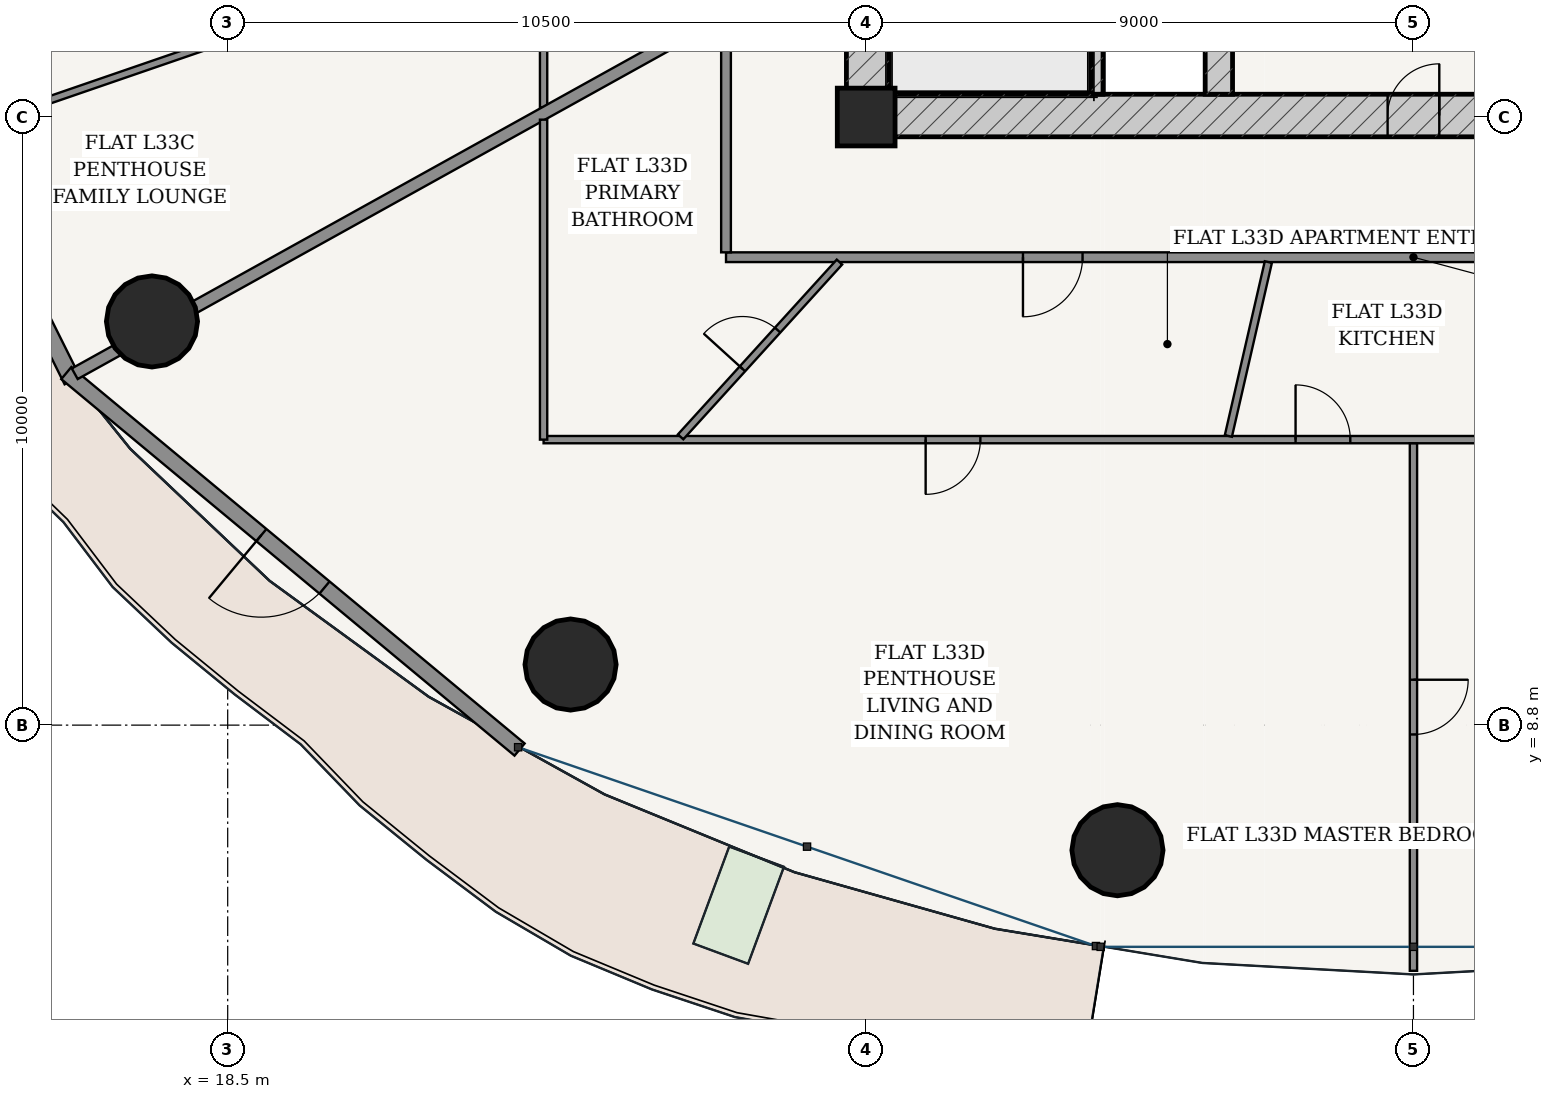
"""IFC4 building model, lengths in metres.
Left out: names, types, materials, properties, quantities, classifications, styles, units other than length and angle.
Written with IfcOpenShell. Run it as: python <this file> out.ifc"""

import sys

from ifc_helpers import new_model, si_unit, direction, frame, frame_2d, origin, origin_2d, place, context, subcontext, project, spatial, rectangle, hollow_circle, extrude, source, transform, mapped, element, fill, save


model = new_model("IFC4")
c1 = context("Model", 3, precision=1e-05, world=origin(), true_north=direction((-0.2419218956, 0.970295726276)))
c2 = subcontext(c1, "Body", "Model", "MODEL_VIEW")
j1 = project(units=[si_unit("LENGTHUNIT", "METRE"), si_unit("PLANEANGLEUNIT", "RADIAN")], contexts=[c1])
p1 = place(None, origin())
s1 = spatial("IfcSite", under=j1, at=p1, CompositionType="ELEMENT")
p2 = place(p1, origin())
s2 = spatial("IfcBuilding", under=s1, at=p2, CompositionType="ELEMENT")
p3 = place(p2, frame((0.0, 0.0, 126.6)))
s3 = spatial("IfcBuildingStorey", under=s2, at=p3, CompositionType="ELEMENT", Elevation=126.6)
p4 = place(p3, frame((29.0, 18.8, 0.0), z_axis=(0.0, 0.0, 1.0), x_axis=(1.0, 0.0, 0.0)))
e1 = element("IfcColumn", 1, at=p4, inside=s3, PredefinedType="COLUMN", context=c2, shape_type="SweptSolid", body=[
    extrude(rectangle(XDim=0.95, YDim=0.95, at=origin_2d()), origin(), (0.0, 0.0, 1.0), 3.6),
])
p5 = place(p3, frame((28.675, 18.825, 0.0), z_axis=(0.0, 0.0, 1.0), x_axis=(1.0, 0.0, 0.0)))
e2 = element("IfcWall", 2, at=p5, inside=s3, PredefinedType="SHEAR", context=c2, shape_type="SweptSolid", body=[
    extrude(rectangle(XDim=18.65, YDim=0.7, at=frame_2d((9.325, 0.0))), origin(), (0.0, 0.0, 1.0), 3.15),
])
p6 = place(p5, frame((8.9, 0.0, 0.0)))
e3 = element("IfcOpeningElement", 3, at=p6, cuts=e2, PredefinedType="OPENING", context=c2, shape_type="SweptSolid", body=[
    extrude(rectangle(XDim=0.85, YDim=2.1, at=frame_2d((0.425, 1.05))), frame((0.0, 0.36, 0.0), z_axis=(0.0, -1.0, 0.0), x_axis=(1.0, 0.0, 0.0)), (0.0, 0.0, 1.0), 0.72),
])
p7 = place(p3, frame((29.025, 19.175, 0.0), z_axis=(0.0, 0.0, 1.0), x_axis=(0.0, 1.0, 0.0)))
e4 = element("IfcWall", 4, at=p7, inside=s3, PredefinedType="SHEAR", context=c2, shape_type="SweptSolid", body=[
    extrude(rectangle(XDim=15.25, YDim=0.7, at=frame_2d((7.625, 0.0))), origin(), (0.0, 0.0, 1.0), 3.15),
])
p8 = place(p7, frame((9.875, 0.0, 0.0)))
e5 = element("IfcOpeningElement", 5, at=p8, cuts=e4, PredefinedType="OPENING", context=c2, shape_type="SweptSolid", body=[
    extrude(rectangle(XDim=1.5, YDim=2.2, at=frame_2d((0.75, 1.1))), frame((0.0, 0.36, 0.0), z_axis=(0.0, -1.0, 0.0), x_axis=(1.0, 0.0, 0.0)), (0.0, 0.0, 1.0), 0.72),
])
p9 = place(p3, frame((32.795, 19.175, 0.0), z_axis=(0.0, 0.0, 1.0), x_axis=(0.0, 1.0, 0.0)))
e6 = element("IfcWall", 6, at=p9, inside=s3, PredefinedType="SOLIDWALL", context=c2, shape_type="SweptSolid", body=[
    extrude(rectangle(XDim=7.375, YDim=0.2, at=frame_2d((3.688, 0.0))), origin(), (0.0, 0.0, 1.0), 3.15),
])
p10 = place(p3, frame((34.8, 19.175, 0.0), z_axis=(0.0, 0.0, 1.0), x_axis=(0.0, 1.0, 0.0)))
e7 = element("IfcWall", 7, at=p10, inside=s3, PredefinedType="SHEAR", context=c2, shape_type="SweptSolid", body=[
    extrude(rectangle(XDim=15.25, YDim=0.45, at=frame_2d((7.625, 0.0))), origin(), (0.0, 0.0, 1.0), 3.15),
])
p11 = place(p10, frame((7.8, 0.0, 0.0)))
e8 = element("IfcOpeningElement", 8, at=p11, cuts=e7, PredefinedType="OPENING", context=c2, shape_type="SweptSolid", body=[
    extrude(rectangle(XDim=1.05, YDim=2.15, at=frame_2d((0.525, 1.075))), frame((0.0, 0.235, 0.0), z_axis=(0.0, -1.0, 0.0), x_axis=(1.0, 0.0, 0.0)), (0.0, 0.0, 1.0), 0.47),
])
for number, where, z_axis, x_axis in (
    (9, (17.255, 15.438, 0.0), (0.0, 0.0, 1.0), (1.0, 0.0, 0.0)),
    (10, (24.138, 9.796, 0.0), (0.0, 0.0, 1.0), (1.0, 0.0, 0.0)),
    (11, (33.133, 6.743, 0.0), (0.0, 0.0, 1.0), (1.0, 0.0, 0.0)),
):
    element("IfcColumn", number, at=place(p3, frame(where, z_axis=z_axis, x_axis=x_axis)), inside=s3, PredefinedType="COLUMN", context=c2, shape_type="SweptSolid", body=[
        extrude(hollow_circle(Radius=0.75, WallThickness=0.045, at=origin_2d()), origin(), (0.0, 0.0, 1.0), 3.6),
    ])
p12 = place(p3, frame((11.905, 22.566, 0.0), z_axis=(0.0, 0.0, 1.0), x_axis=(0.446274562077, -0.894896091869, 0.0)))
e12 = element("IfcWall", 12, at=p12, inside=s3, PredefinedType="SOLIDWALL", context=c2, shape_type="SweptSolid", body=[
    extrude(rectangle(XDim=9.05, YDim=0.28, at=frame_2d((4.525, 0.0))), origin(), (0.0, 0.0, 1.0), 3.15),
])
p13 = place(p12, frame((1.394, 0.0, 0.85)))
e13 = element("IfcOpeningElement", 13, at=p13, cuts=e12, PredefinedType="OPENING", context=c2, shape_type="SweptSolid", body=[
    extrude(rectangle(XDim=2.1, YDim=1.95, at=frame_2d((1.05, 0.975))), frame((0.0, 0.15, 0.0), z_axis=(0.0, -1.0, 0.0), x_axis=(1.0, 0.0, 0.0)), (0.0, 0.0, 1.0), 0.3),
])
p14 = place(p12, frame((5.557, 0.0, 0.85)))
e14 = element("IfcOpeningElement", 14, at=p14, cuts=e12, PredefinedType="OPENING", context=c2, shape_type="SweptSolid", body=[
    extrude(rectangle(XDim=2.1, YDim=1.95, at=frame_2d((1.05, 0.975))), frame((0.0, 0.15, 0.0), z_axis=(0.0, -1.0, 0.0), x_axis=(1.0, 0.0, 0.0)), (0.0, 0.0, 1.0), 0.3),
])
p15 = place(p3, frame((15.846, 14.59, 0.0), z_axis=(0.0, 0.0, 1.0), x_axis=(0.769254958887, -0.638941944333, 0.0)))
e15 = element("IfcWall", 15, at=p15, inside=s3, PredefinedType="SOLIDWALL", context=c2, shape_type="SweptSolid", body=[
    extrude(rectangle(XDim=9.69, YDim=0.26, at=frame_2d((4.845, 0.0))), origin(), (0.0, 0.0, 1.0), 3.15),
])
p16 = place(p15, frame((4.17, 0.0, 0.0)))
e16 = element("IfcOpeningElement", 16, at=p16, cuts=e15, PredefinedType="OPENING", context=c2, shape_type="SweptSolid", body=[
    extrude(rectangle(XDim=1.35, YDim=2.2, at=frame_2d((0.675, 1.1))), frame((0.0, 0.14, 0.0), z_axis=(0.0, -1.0, 0.0), x_axis=(1.0, 0.0, 0.0)), (0.0, 0.0, 1.0), 0.28),
])
p17 = place(p3, frame((26.695, 16.495, 0.0), z_axis=(0.0, 0.0, 1.0), x_axis=(1.0, 0.0, 0.0)))
e17 = element("IfcWall", 17, at=p17, inside=s3, PredefinedType="PARTITIONING", context=c2, shape_type="SweptSolid", body=[
    extrude(rectangle(XDim=22.61, YDim=0.16, at=frame_2d((11.305, 0.0))), origin(), (0.0, 0.0, 1.0), 2.596),
])
p18 = place(p17, frame((4.883, 0.0, 0.0)))
e18 = element("IfcOpeningElement", 18, at=p18, cuts=e17, PredefinedType="OPENING", context=c2, shape_type="SweptSolid", body=[
    extrude(rectangle(XDim=0.98, YDim=2.2, at=frame_2d((0.49, 1.1))), frame((0.0, 0.09, 0.0), z_axis=(0.0, -1.0, 0.0), x_axis=(1.0, 0.0, 0.0)), (0.0, 0.0, 1.0), 0.18),
])
p19 = place(p3, frame((26.695, 16.575, 0.0), z_axis=(0.0, 0.0, 1.0), x_axis=(0.0, 1.0, 0.0)))
e19 = element("IfcWall", 19, at=p19, inside=s3, PredefinedType="PARTITIONING", context=c2, shape_type="SweptSolid", body=[
    extrude(rectangle(XDim=20.45, YDim=0.16, at=frame_2d((10.225, 0.0))), origin(), (0.0, 0.0, 1.0), 2.596),
])
p20 = place(p19, frame((9.547, 0.0, 0.0)))
e20 = element("IfcOpeningElement", 20, at=p20, cuts=e19, PredefinedType="OPENING", context=c2, shape_type="SweptSolid", body=[
    extrude(rectangle(XDim=0.98, YDim=2.2, at=frame_2d((0.49, 1.1))), frame((0.0, 0.09, 0.0), z_axis=(0.0, -1.0, 0.0), x_axis=(1.0, 0.0, 0.0)), (0.0, 0.0, 1.0), 0.18),
])
p21 = place(p3, frame((23.695, 18.961, 0.0), z_axis=(0.0, 0.0, 1.0), x_axis=(0.0, 1.0, 0.0)))
e21 = element("IfcWall", 21, at=p21, inside=s3, PredefinedType="PARTITIONING", context=c2, shape_type="SweptSolid", body=[
    extrude(rectangle(XDim=15.679, YDim=0.12, at=frame_2d((7.839, 0.0))), origin(), (0.0, 0.0, 1.0), 2.596),
])
p22 = place(p21, frame((7.625, 0.0, 0.0)))
e22 = element("IfcOpeningElement", 22, at=p22, cuts=e21, PredefinedType="OPENING", context=c2, shape_type="SweptSolid", body=[
    extrude(rectangle(XDim=0.9, YDim=2.15, at=frame_2d((0.45, 1.075))), frame((0.0, 0.07, 0.0), z_axis=(0.0, -1.0, 0.0), x_axis=(1.0, 0.0, 0.0)), (0.0, 0.0, 1.0), 0.14),
])
p23 = place(p21, frame((1.128, 0.0, 0.0)))
e23 = element("IfcOpeningElement", 23, at=p23, cuts=e21, PredefinedType="OPENING", context=c2, shape_type="SweptSolid", body=[
    extrude(rectangle(XDim=0.9, YDim=2.15, at=frame_2d((0.45, 1.075))), frame((0.0, 0.07, 0.0), z_axis=(0.0, -1.0, 0.0), x_axis=(1.0, 0.0, 0.0)), (0.0, 0.0, 1.0), 0.14),
])
p24 = place(p3, frame((23.636, 21.857, 0.0), z_axis=(0.0, 0.0, 1.0), x_axis=(-0.945571197348, -0.325415289661, 0.0)))
e24 = element("IfcWall", 24, at=p24, inside=s3, PredefinedType="PARTITIONING", context=c2, shape_type="SweptSolid", body=[
    extrude(rectangle(XDim=10.737, YDim=0.12, at=frame_2d((5.368, 0.0))), origin(), (0.0, 0.0, 1.0), 2.666),
])
p25 = place(p24, frame((4.918, 0.0, 0.0)))
e25 = element("IfcOpeningElement", 25, at=p25, cuts=e24, PredefinedType="OPENING", context=c2, shape_type="SweptSolid", body=[
    extrude(rectangle(XDim=0.9, YDim=2.15, at=frame_2d((0.45, 1.075))), frame((0.0, 0.07, 0.0), z_axis=(0.0, -1.0, 0.0), x_axis=(1.0, 0.0, 0.0)), (0.0, 0.0, 1.0), 0.14),
])
p26 = place(p3, frame((26.615, 20.48, 0.0), z_axis=(0.0, 0.0, 1.0), x_axis=(-0.874310671773, -0.48536671623, 0.0)))
e26 = element("IfcWall", 26, at=p26, inside=s3, PredefinedType="PARTITIONING", context=c2, shape_type="SweptSolid", body=[
    extrude(rectangle(XDim=12.159, YDim=0.2, at=frame_2d((6.079, 0.0))), origin(), (0.0, 0.0, 1.0), 2.5),
])
p27 = place(p3, frame((48.598, 13.495, 0.0), z_axis=(0.0, 0.0, 1.0), x_axis=(-1.0, 0.0, 0.0)))
e27 = element("IfcWall", 27, at=p27, inside=s3, PredefinedType="PARTITIONING", context=c2, shape_type="SweptSolid", body=[
    extrude(rectangle(XDim=24.903, YDim=0.12, at=frame_2d((12.452, 0.0))), origin(), (0.0, 0.0, 1.0), 2.596),
])
p28 = place(p27, frame((17.72, 0.0, 0.0)))
e28 = element("IfcOpeningElement", 28, at=p28, cuts=e27, PredefinedType="OPENING", context=c2, shape_type="SweptSolid", body=[
    extrude(rectangle(XDim=0.9, YDim=2.15, at=frame_2d((0.45, 1.075))), frame((0.0, 0.07, 0.0), z_axis=(0.0, -1.0, 0.0), x_axis=(1.0, 0.0, 0.0)), (0.0, 0.0, 1.0), 0.14),
])
p29 = place(p27, frame((11.637, 0.0, 0.0)))
e29 = element("IfcOpeningElement", 29, at=p29, cuts=e27, PredefinedType="OPENING", context=c2, shape_type="SweptSolid", body=[
    extrude(rectangle(XDim=0.9, YDim=2.15, at=frame_2d((0.45, 1.075))), frame((0.0, 0.07, 0.0), z_axis=(0.0, -1.0, 0.0), x_axis=(1.0, 0.0, 0.0)), (0.0, 0.0, 1.0), 0.14),
])
p30 = place(p27, frame((3.376, 0.0, 0.0)))
e30 = element("IfcOpeningElement", 30, at=p30, cuts=e27, PredefinedType="OPENING", context=c2, shape_type="SweptSolid", body=[
    extrude(rectangle(XDim=0.9, YDim=2.15, at=frame_2d((0.45, 1.075))), frame((0.0, 0.07, 0.0), z_axis=(0.0, -1.0, 0.0), x_axis=(1.0, 0.0, 0.0)), (0.0, 0.0, 1.0), 0.14),
])
p31 = place(p3, frame((23.695, 13.495, 0.0), z_axis=(0.0, 0.0, 1.0), x_axis=(0.0, 1.0, 0.0)))
e31 = element("IfcWall", 31, at=p31, inside=s3, PredefinedType="PARTITIONING", context=c2, shape_type="SweptSolid", body=[
    extrude(rectangle(XDim=5.261, YDim=0.12, at=frame_2d((2.631, 0.0))), origin(), (0.0, 0.0, 1.0), 2.596),
])
p32 = place(p3, frame((38.0, 13.433, 0.0), z_axis=(0.0, 0.0, 1.0), x_axis=(0.0, -1.0, 0.0)))
e32 = element("IfcWall", 32, at=p32, inside=s3, PredefinedType="PARTITIONING", context=c2, shape_type="SweptSolid", body=[
    extrude(rectangle(XDim=8.673, YDim=0.12, at=frame_2d((4.336, 0.0))), origin(), (0.0, 0.0, 1.0), 2.666),
])
p33 = place(p32, frame((3.886, 0.0, 0.0)))
e33 = element("IfcOpeningElement", 33, at=p33, cuts=e32, PredefinedType="OPENING", context=c2, shape_type="SweptSolid", body=[
    extrude(rectangle(XDim=0.9, YDim=2.15, at=frame_2d((0.45, 1.075))), frame((0.0, 0.07, 0.0), z_axis=(0.0, -1.0, 0.0), x_axis=(1.0, 0.0, 0.0)), (0.0, 0.0, 1.0), 0.14),
])
p34 = place(p3, frame((28.561, 16.415, 0.0), z_axis=(0.0, 0.0, 1.0), x_axis=(-0.672578928456, -0.740025394833, 0.0)))
e34 = element("IfcWall", 34, at=p34, inside=s3, PredefinedType="PARTITIONING", context=c2, shape_type="SweptSolid", body=[
    extrude(rectangle(XDim=3.884, YDim=0.12, at=frame_2d((1.942, 0.0))), origin(), (0.0, 0.0, 1.0), 2.596),
])
p35 = place(p34, frame((1.512, 0.0, 0.0)))
e35 = element("IfcOpeningElement", 35, at=p35, cuts=e34, PredefinedType="OPENING", context=c2, shape_type="SweptSolid", body=[
    extrude(rectangle(XDim=0.86, YDim=2.15, at=frame_2d((0.43, 1.075))), frame((0.0, 0.07, 0.0), z_axis=(0.0, -1.0, 0.0), x_axis=(1.0, 0.0, 0.0)), (0.0, 0.0, 1.0), 0.14),
])
p36 = place(p3, frame((35.614, 16.415, 0.0), z_axis=(0.0, 0.0, 1.0), x_axis=(-0.223911395669, -0.974609504822, 0.0)))
e36 = element("IfcWall", 36, at=p36, inside=s3, PredefinedType="PARTITIONING", context=c2, shape_type="SweptSolid", body=[
    extrude(rectangle(XDim=2.934, YDim=0.12, at=frame_2d((1.467, 0.0))), origin(), (0.0, 0.0, 1.0), 2.596),
])
m1 = source(origin(), c2, "Body", "SweptSolid", [
    extrude(rectangle(XDim=1.35, YDim=2.2, at=frame_2d((0.675, 1.1))), frame((0.0, 0.025, 0.0), z_axis=(0.0, -1.0, 0.0), x_axis=(1.0, 0.0, 0.0)), (0.0, 0.0, 1.0), 0.05),
])
p37 = place(p16, frame((1.35, 0.0, 0.0), z_axis=(0.0, 0.0, 1.0), x_axis=(-1.0, 0.0, 0.0)))
e37 = element("IfcDoor", 37, at=p37, inside=s3, OperationType="SINGLE_SWING_RIGHT", PredefinedType="DOOR", context=c2, shape_type="MappedRepresentation", body=[
    mapped(m1, transform((0.0, 0.0, 0.0), scale=1.0)),
])
fill(e16, e37)
m2 = source(origin(), c2, "Body", "SweptSolid", [
    extrude(rectangle(XDim=0.85, YDim=2.1, at=frame_2d((0.425, 1.05))), frame((0.0, 0.025, 0.0), z_axis=(0.0, -1.0, 0.0), x_axis=(1.0, 0.0, 0.0)), (0.0, 0.0, 1.0), 0.05),
])
p38 = place(p6, origin())
e38 = element("IfcDoor", 38, at=p38, inside=s3, OperationType="SINGLE_SWING_RIGHT", PredefinedType="DOOR", context=c2, shape_type="MappedRepresentation", body=[
    mapped(m2, transform((0.0, 0.0, 0.0), scale=1.0)),
])
fill(e3, e38)
m3 = source(origin(), c2, "Body", "SweptSolid", [
    extrude(rectangle(XDim=0.98, YDim=2.2, at=frame_2d((0.49, 1.1))), frame((0.0, 0.025, 0.0), z_axis=(0.0, -1.0, 0.0), x_axis=(1.0, 0.0, 0.0)), (0.0, 0.0, 1.0), 0.05),
])
p39 = place(p18, frame((0.98, 0.0, 0.0), z_axis=(0.0, 0.0, 1.0), x_axis=(-1.0, 0.0, 0.0)))
e39 = element("IfcDoor", 39, at=p39, inside=s3, OperationType="SINGLE_SWING_RIGHT", PredefinedType="DOOR", context=c2, shape_type="MappedRepresentation", body=[
    mapped(m3, transform((0.0, 0.0, 0.0), scale=1.0)),
])
fill(e18, e39)
m4 = source(origin(), c2, "Body", "SweptSolid", [
    extrude(rectangle(XDim=0.86, YDim=2.15, at=frame_2d((0.43, 1.075))), frame((0.0, 0.025, 0.0), z_axis=(0.0, -1.0, 0.0), x_axis=(1.0, 0.0, 0.0)), (0.0, 0.0, 1.0), 0.05),
])
p40 = place(p35, frame((0.86, 0.0, 0.0), z_axis=(0.0, 0.0, 1.0), x_axis=(-1.0, 0.0, 0.0)))
e40 = element("IfcDoor", 40, at=p40, inside=s3, OperationType="SINGLE_SWING_LEFT", PredefinedType="DOOR", context=c2, shape_type="MappedRepresentation", body=[
    mapped(m4, transform((0.0, 0.0, 0.0), scale=1.0)),
])
fill(e35, e40)
m5 = source(origin(), c2, "Body", "SweptSolid", [
    extrude(rectangle(XDim=0.9, YDim=2.15, at=frame_2d((0.45, 1.075))), frame((0.0, 0.025, 0.0), z_axis=(0.0, -1.0, 0.0), x_axis=(1.0, 0.0, 0.0)), (0.0, 0.0, 1.0), 0.05),
])
p41 = place(p28, origin())
e41 = element("IfcDoor", 41, at=p41, inside=s3, OperationType="SINGLE_SWING_RIGHT", PredefinedType="DOOR", context=c2, shape_type="MappedRepresentation", body=[
    mapped(m5, transform((0.0, 0.0, 0.0), scale=1.0)),
])
fill(e28, e41)
p42 = place(p29, frame((0.9, 0.0, 0.0), z_axis=(0.0, 0.0, 1.0), x_axis=(-1.0, 0.0, 0.0)))
e42 = element("IfcDoor", 42, at=p42, inside=s3, OperationType="SINGLE_SWING_LEFT", PredefinedType="DOOR", context=c2, shape_type="MappedRepresentation", body=[
    mapped(m5, transform((0.0, 0.0, 0.0), scale=1.0)),
])
fill(e29, e42)
p43 = place(p33, origin())
e43 = element("IfcDoor", 43, at=p43, inside=s3, OperationType="SINGLE_SWING_LEFT", PredefinedType="DOOR", context=c2, shape_type="MappedRepresentation", body=[
    mapped(m5, transform((0.0, 0.0, 0.0), scale=1.0)),
])
fill(e33, e43)
save(model, sys.argv[1])
